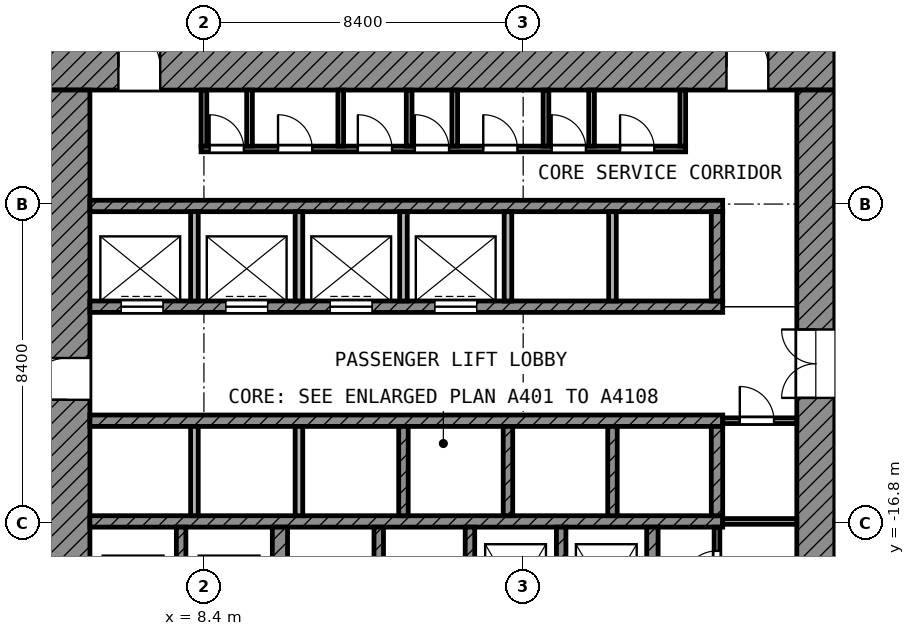
"""IFC4 building model, lengths in metres.
Left out: names, types, materials, properties, quantities, classifications, styles, units other than length and angle.
Written with IfcOpenShell. Run it as: python <this file> out.ifc"""

import sys

from ifc_helpers import new_model, si_unit, direction, frame, frame_2d, origin, place, context, subcontext, project, spatial, rectangle, extrude, element, fill, save


model = new_model("IFC4")
c1 = context("Model", 3, precision=1e-05, world=origin(), true_north=direction((0.0, 1.0)))
c2 = subcontext(c1, "Body", "Model", "MODEL_VIEW")
j1 = project(units=[si_unit("LENGTHUNIT", "METRE"), si_unit("PLANEANGLEUNIT", "RADIAN")], contexts=[c1])
p1 = place(None, origin())
s1 = spatial("IfcSite", under=j1, at=p1, CompositionType="ELEMENT")
p2 = place(p1, origin())
s2 = spatial("IfcBuilding", under=s1, at=p2, CompositionType="ELEMENT")
p3 = place(p2, frame((0.0, 0.0, 132.4)))
s3 = spatial("IfcBuildingStorey", under=s2, at=p3, CompositionType="ELEMENT", Elevation=132.4)
p4 = place(p3, frame((4.2, -4.8, 0.0), z_axis=(0.0, 0.0, 1.0), x_axis=(1.0, 0.0, 0.0)))
e1 = element("IfcWall", 1, at=p4, inside=s3, PredefinedType="SHEAR", context=c2, shape_type="SweptSolid", body=[
    extrude(rectangle(XDim=20.8, YDim=1.2, at=frame_2d((10.4, 0.0))), origin(), (0.0, 0.0, 1.0), 3.6),
])
p5 = place(p4, frame((1.95, 0.0, 0.0)))
e2 = element("IfcOpeningElement", 2, at=p5, cuts=e1, PredefinedType="OPENING", context=c2, shape_type="SweptSolid", body=[
    extrude(rectangle(XDim=1.1, YDim=2.1, at=frame_2d((0.55, 1.05))), frame((0.0, 0.61, 0.0), z_axis=(0.0, -1.0, 0.0), x_axis=(1.0, 0.0, 0.0)), (0.0, 0.0, 1.0), 1.22),
])
p6 = place(p4, frame((17.95, 0.0, 0.0)))
e3 = element("IfcOpeningElement", 3, at=p6, cuts=e1, PredefinedType="OPENING", context=c2, shape_type="SweptSolid", body=[
    extrude(rectangle(XDim=1.1, YDim=2.1, at=frame_2d((0.55, 1.05))), frame((0.0, 0.61, 0.0), z_axis=(0.0, -1.0, 0.0), x_axis=(1.0, 0.0, 0.0)), (0.0, 0.0, 1.0), 1.22),
])
p7 = place(p3, frame((4.8, -25.0, 0.0), z_axis=(0.0, 0.0, 1.0), x_axis=(0.0, 1.0, 0.0)))
e4 = element("IfcWall", 4, at=p7, inside=s3, PredefinedType="SHEAR", context=c2, shape_type="SweptSolid", body=[
    extrude(rectangle(XDim=19.6, YDim=1.2, at=frame_2d((9.8, 0.0))), origin(), (0.0, 0.0, 1.0), 3.6),
])
p8 = place(p7, frame((11.45, 0.0, 0.0)))
e5 = element("IfcOpeningElement", 5, at=p8, cuts=e4, PredefinedType="OPENING", context=c2, shape_type="SweptSolid", body=[
    extrude(rectangle(XDim=1.1, YDim=2.1, at=frame_2d((0.55, 1.05))), frame((0.0, 0.61, 0.0), z_axis=(0.0, -1.0, 0.0), x_axis=(1.0, 0.0, 0.0)), (0.0, 0.0, 1.0), 1.22),
])
p9 = place(p7, frame((2.15, 0.0, 0.0)))
e6 = element("IfcOpeningElement", 6, at=p9, cuts=e4, PredefinedType="OPENING", context=c2, shape_type="SweptSolid", body=[
    extrude(rectangle(XDim=1.1, YDim=2.1, at=frame_2d((0.55, 1.05))), frame((0.0, 0.61, 0.0), z_axis=(0.0, -1.0, 0.0), x_axis=(1.0, 0.0, 0.0)), (0.0, 0.0, 1.0), 1.22),
])
p10 = place(p3, frame((24.5, -24.0, 0.0), z_axis=(0.0, 0.0, 1.0), x_axis=(0.0, 1.0, 0.0)))
e7 = element("IfcWall", 7, at=p10, inside=s3, PredefinedType="SHEAR", context=c2, shape_type="SweptSolid", body=[
    extrude(rectangle(XDim=18.6, YDim=1.0, at=frame_2d((9.3, 0.0))), origin(), (0.0, 0.0, 1.0), 3.6),
])
p11 = place(p10, frame((10.5, 0.0, 0.0)))
e8 = element("IfcOpeningElement", 8, at=p11, cuts=e7, PredefinedType="OPENING", context=c2, shape_type="SweptSolid", body=[
    extrude(rectangle(XDim=1.8, YDim=2.1, at=frame_2d((0.9, 1.05))), frame((0.0, 0.51, 0.0), z_axis=(0.0, -1.0, 0.0), x_axis=(1.0, 0.0, 0.0)), (0.0, 0.0, 1.0), 1.02),
])
p12 = place(p3, frame((5.4, -8.45, 0.0), z_axis=(0.0, 0.0, 1.0), x_axis=(1.0, 0.0, 0.0)))
e9 = element("IfcWall", 9, at=p12, inside=s3, PredefinedType="SHEAR", context=c2, shape_type="SweptSolid", body=[
    extrude(rectangle(XDim=16.65, YDim=0.3, at=frame_2d((8.325, 0.0))), origin(), (0.0, 0.0, 1.0), 3.6),
])
p13 = place(p3, frame((5.4, -11.1, 0.0), z_axis=(0.0, 0.0, 1.0), x_axis=(1.0, 0.0, 0.0)))
e10 = element("IfcWall", 10, at=p13, inside=s3, PredefinedType="SHEAR", context=c2, shape_type="SweptSolid", body=[
    extrude(rectangle(XDim=16.65, YDim=0.3, at=frame_2d((8.325, 0.0))), origin(), (0.0, 0.0, 1.0), 3.6),
])
p14 = place(p13, frame((0.825, 0.0, 0.0)))
e11 = element("IfcOpeningElement", 11, at=p14, cuts=e10, PredefinedType="OPENING", context=c2, shape_type="SweptSolid", body=[
    extrude(rectangle(XDim=1.1, YDim=2.1, at=frame_2d((0.55, 1.05))), frame((0.0, 0.16, 0.0), z_axis=(0.0, -1.0, 0.0), x_axis=(1.0, 0.0, 0.0)), (0.0, 0.0, 1.0), 0.32),
])
p15 = place(p13, frame((3.575, 0.0, 0.0)))
e12 = element("IfcOpeningElement", 12, at=p15, cuts=e10, PredefinedType="OPENING", context=c2, shape_type="SweptSolid", body=[
    extrude(rectangle(XDim=1.1, YDim=2.1, at=frame_2d((0.55, 1.05))), frame((0.0, 0.16, 0.0), z_axis=(0.0, -1.0, 0.0), x_axis=(1.0, 0.0, 0.0)), (0.0, 0.0, 1.0), 0.32),
])
p16 = place(p13, frame((6.325, 0.0, 0.0)))
e13 = element("IfcOpeningElement", 13, at=p16, cuts=e10, PredefinedType="OPENING", context=c2, shape_type="SweptSolid", body=[
    extrude(rectangle(XDim=1.1, YDim=2.1, at=frame_2d((0.55, 1.05))), frame((0.0, 0.16, 0.0), z_axis=(0.0, -1.0, 0.0), x_axis=(1.0, 0.0, 0.0)), (0.0, 0.0, 1.0), 0.32),
])
p17 = place(p13, frame((9.075, 0.0, 0.0)))
e14 = element("IfcOpeningElement", 14, at=p17, cuts=e10, PredefinedType="OPENING", context=c2, shape_type="SweptSolid", body=[
    extrude(rectangle(XDim=1.1, YDim=2.1, at=frame_2d((0.55, 1.05))), frame((0.0, 0.16, 0.0), z_axis=(0.0, -1.0, 0.0), x_axis=(1.0, 0.0, 0.0)), (0.0, 0.0, 1.0), 0.32),
])
for number, where, z_axis, x_axis in (
    (15, (5.4, -14.1, 0.0), (0.0, 0.0, 1.0), (1.0, 0.0, 0.0)),
    (16, (5.4, -16.75, 0.0), (0.0, 0.0, 1.0), (1.0, 0.0, 0.0)),
):
    element("IfcWall", number, at=place(p3, frame(where, z_axis=z_axis, x_axis=x_axis)), inside=s3, PredefinedType="SHEAR", context=c2, shape_type="SweptSolid", body=[
        extrude(rectangle(XDim=16.65, YDim=0.3, at=frame_2d((8.325, 0.0))), origin(), (0.0, 0.0, 1.0), 3.6),
    ])
p18 = place(p3, frame((10.4, -20.05, 0.0), z_axis=(0.0, 0.0, 1.0), x_axis=(0.0, 1.0, 0.0)))
e17 = element("IfcWall", 17, at=p18, inside=s3, PredefinedType="SHEAR", context=c2, shape_type="SweptSolid", body=[
    extrude(rectangle(XDim=3.15, YDim=0.4, at=frame_2d((1.575, 0.0))), origin(), (0.0, 0.0, 1.0), 3.6),
])
p19 = place(p3, frame((20.2, -20.35, 0.0), z_axis=(0.0, 0.0, 1.0), x_axis=(0.0, 1.0, 0.0)))
e18 = element("IfcWall", 18, at=p19, inside=s3, PredefinedType="SHEAR", context=c2, shape_type="SweptSolid", body=[
    extrude(rectangle(XDim=3.45, YDim=0.3, at=frame_2d((1.725, 0.0))), origin(), (0.0, 0.0, 1.0), 3.6),
])
p20 = place(p3, frame((21.9, -10.95, 0.0), z_axis=(0.0, 0.0, 1.0), x_axis=(0.0, 1.0, 0.0)))
e19 = element("IfcWall", 19, at=p20, inside=s3, PredefinedType="SHEAR", context=c2, shape_type="SweptSolid", body=[
    extrude(rectangle(XDim=2.35, YDim=0.3, at=frame_2d((1.175, 0.0))), origin(), (0.0, 0.0, 1.0), 3.6),
])
p21 = place(p3, frame((21.9, -16.6, 0.0), z_axis=(0.0, 0.0, 1.0), x_axis=(0.0, 1.0, 0.0)))
e20 = element("IfcWall", 20, at=p21, inside=s3, PredefinedType="SHEAR", context=c2, shape_type="SweptSolid", body=[
    extrude(rectangle(XDim=2.35, YDim=0.3, at=frame_2d((1.175, 0.0))), origin(), (0.0, 0.0, 1.0), 3.6),
])
for number, where, z_axis, x_axis in (
    (21, (7.8, -20.05, 0.0), (0.0, 0.0, 1.0), (0.0, 1.0, 0.0)),
    (22, (13.0, -20.05, 0.0), (0.0, 0.0, 1.0), (0.0, 1.0, 0.0)),
    (23, (15.4, -20.05, 0.0), (0.0, 0.0, 1.0), (0.0, 1.0, 0.0)),
    (24, (17.8, -20.05, 0.0), (0.0, 0.0, 1.0), (0.0, 1.0, 0.0)),
):
    element("IfcWall", number, at=place(p3, frame(where, z_axis=z_axis, x_axis=x_axis)), inside=s3, PredefinedType="SHEAR", context=c2, shape_type="SweptSolid", body=[
        extrude(rectangle(XDim=3.15, YDim=0.25, at=frame_2d((1.575, 0.0))), origin(), (0.0, 0.0, 1.0), 3.6),
    ])
for number, where, z_axis, x_axis in (
    (25, (8.15, -10.95, 0.0), (0.0, 0.0, 1.0), (0.0, 1.0, 0.0)),
    (26, (10.9, -10.95, 0.0), (0.0, 0.0, 1.0), (0.0, 1.0, 0.0)),
    (27, (13.65, -10.95, 0.0), (0.0, 0.0, 1.0), (0.0, 1.0, 0.0)),
    (28, (16.4, -10.95, 0.0), (0.0, 0.0, 1.0), (0.0, 1.0, 0.0)),
    (29, (19.15, -10.95, 0.0), (0.0, 0.0, 1.0), (0.0, 1.0, 0.0)),
):
    element("IfcWall", number, at=place(p3, frame(where, z_axis=z_axis, x_axis=x_axis)), inside=s3, PredefinedType="PARTITIONING", context=c2, shape_type="SweptSolid", body=[
        extrude(rectangle(XDim=2.35, YDim=0.2, at=frame_2d((1.175, 0.0))), origin(), (0.0, 0.0, 1.0), 3.6),
    ])
for number, where, z_axis, x_axis in (
    (30, (8.15, -16.6, 0.0), (0.0, 0.0, 1.0), (0.0, 1.0, 0.0)),
    (31, (10.9, -16.6, 0.0), (0.0, 0.0, 1.0), (0.0, 1.0, 0.0)),
):
    element("IfcWall", number, at=place(p3, frame(where, z_axis=z_axis, x_axis=x_axis)), inside=s3, PredefinedType="PARTITIONING", context=c2, shape_type="SweptSolid", body=[
        extrude(rectangle(XDim=2.35, YDim=0.2, at=frame_2d((1.175, 0.0))), origin(), (0.0, 0.0, 1.0), 3.6),
    ])
for number, where, z_axis, x_axis in (
    (32, (13.65, -16.6, 0.0), (0.0, 0.0, 1.0), (0.0, 1.0, 0.0)),
    (33, (16.4, -16.6, 0.0), (0.0, 0.0, 1.0), (0.0, 1.0, 0.0)),
    (34, (19.15, -16.6, 0.0), (0.0, 0.0, 1.0), (0.0, 1.0, 0.0)),
):
    element("IfcWall", number, at=place(p3, frame(where, z_axis=z_axis, x_axis=x_axis)), inside=s3, PredefinedType="SHEAR", context=c2, shape_type="SweptSolid", body=[
        extrude(rectangle(XDim=2.35, YDim=0.25, at=frame_2d((1.175, 0.0))), origin(), (0.0, 0.0, 1.0), 3.6),
    ])
p22 = place(p3, frame((21.9, -19.05, 0.0), z_axis=(0.0, 0.0, 1.0), x_axis=(0.0, 1.0, 0.0)))
e35 = element("IfcWall", 35, at=p22, inside=s3, PredefinedType="PARTITIONING", context=c2, shape_type="SweptSolid", body=[
    extrude(rectangle(XDim=2.15, YDim=0.15, at=frame_2d((1.075, 0.0))), origin(), (0.0, 0.0, 1.0), 3.6),
])
p23 = place(p22, frame((0.625, 0.0, 0.0)))
e36 = element("IfcOpeningElement", 36, at=p23, cuts=e35, PredefinedType="OPENING", context=c2, shape_type="SweptSolid", body=[
    extrude(rectangle(XDim=0.9, YDim=2.1, at=frame_2d((0.45, 1.05))), frame((0.0, 0.085, 0.0), z_axis=(0.0, -1.0, 0.0), x_axis=(1.0, 0.0, 0.0)), (0.0, 0.0, 1.0), 0.17),
])
p24 = place(p3, frame((22.05, -16.75, 0.0), z_axis=(0.0, 0.0, 1.0), x_axis=(1.0, 0.0, 0.0)))
e37 = element("IfcWall", 37, at=p24, inside=s3, PredefinedType="PARTITIONING", context=c2, shape_type="SweptSolid", body=[
    extrude(rectangle(XDim=1.95, YDim=0.15, at=frame_2d((0.975, 0.0))), origin(), (0.0, 0.0, 1.0), 3.6),
])
p25 = place(p3, frame((22.05, -14.1, 0.0), z_axis=(0.0, 0.0, 1.0), x_axis=(1.0, 0.0, 0.0)))
e38 = element("IfcWall", 38, at=p25, inside=s3, PredefinedType="PARTITIONING", context=c2, shape_type="SweptSolid", body=[
    extrude(rectangle(XDim=1.95, YDim=0.15, at=frame_2d((0.975, 0.0))), origin(), (0.0, 0.0, 1.0), 3.6),
])
p26 = place(p25, frame((0.45, 0.0, 0.0)))
e39 = element("IfcOpeningElement", 39, at=p26, cuts=e38, PredefinedType="OPENING", context=c2, shape_type="SweptSolid", body=[
    extrude(rectangle(XDim=0.9, YDim=2.1, at=frame_2d((0.45, 1.05))), frame((0.0, 0.085, 0.0), z_axis=(0.0, -1.0, 0.0), x_axis=(1.0, 0.0, 0.0)), (0.0, 0.0, 1.0), 0.17),
])
p27 = place(p3, frame((8.325, -6.95, 0.0), z_axis=(0.0, 0.0, 1.0), x_axis=(1.0, 0.0, 0.0)))
e40 = element("IfcWall", 40, at=p27, inside=s3, PredefinedType="PARTITIONING", context=c2, shape_type="SweptSolid", body=[
    extrude(rectangle(XDim=12.75, YDim=0.15, at=frame_2d((6.375, 0.0))), origin(), (0.0, 0.0, 1.0), 3.6),
])
p28 = place(p27, frame((0.225, 0.0, 0.0)))
e41 = element("IfcOpeningElement", 41, at=p28, cuts=e40, PredefinedType="OPENING", context=c2, shape_type="SweptSolid", body=[
    extrude(rectangle(XDim=0.9, YDim=2.1, at=frame_2d((0.45, 1.05))), frame((0.0, 0.085, 0.0), z_axis=(0.0, -1.0, 0.0), x_axis=(1.0, 0.0, 0.0)), (0.0, 0.0, 1.0), 0.17),
])
p29 = place(p27, frame((2.025, 0.0, 0.0)))
e42 = element("IfcOpeningElement", 42, at=p29, cuts=e40, PredefinedType="OPENING", context=c2, shape_type="SweptSolid", body=[
    extrude(rectangle(XDim=0.9, YDim=2.1, at=frame_2d((0.45, 1.05))), frame((0.0, 0.085, 0.0), z_axis=(0.0, -1.0, 0.0), x_axis=(1.0, 0.0, 0.0)), (0.0, 0.0, 1.0), 0.17),
])
p30 = place(p27, frame((4.125, 0.0, 0.0)))
e43 = element("IfcOpeningElement", 43, at=p30, cuts=e40, PredefinedType="OPENING", context=c2, shape_type="SweptSolid", body=[
    extrude(rectangle(XDim=0.9, YDim=2.1, at=frame_2d((0.45, 1.05))), frame((0.0, 0.085, 0.0), z_axis=(0.0, -1.0, 0.0), x_axis=(1.0, 0.0, 0.0)), (0.0, 0.0, 1.0), 0.17),
])
p31 = place(p27, frame((5.625, 0.0, 0.0)))
e44 = element("IfcOpeningElement", 44, at=p31, cuts=e40, PredefinedType="OPENING", context=c2, shape_type="SweptSolid", body=[
    extrude(rectangle(XDim=0.9, YDim=2.1, at=frame_2d((0.45, 1.05))), frame((0.0, 0.085, 0.0), z_axis=(0.0, -1.0, 0.0), x_axis=(1.0, 0.0, 0.0)), (0.0, 0.0, 1.0), 0.17),
])
p32 = place(p27, frame((7.425, 0.0, 0.0)))
e45 = element("IfcOpeningElement", 45, at=p32, cuts=e40, PredefinedType="OPENING", context=c2, shape_type="SweptSolid", body=[
    extrude(rectangle(XDim=0.9, YDim=2.1, at=frame_2d((0.45, 1.05))), frame((0.0, 0.085, 0.0), z_axis=(0.0, -1.0, 0.0), x_axis=(1.0, 0.0, 0.0)), (0.0, 0.0, 1.0), 0.17),
])
p33 = place(p27, frame((9.225, 0.0, 0.0)))
e46 = element("IfcOpeningElement", 46, at=p33, cuts=e40, PredefinedType="OPENING", context=c2, shape_type="SweptSolid", body=[
    extrude(rectangle(XDim=0.9, YDim=2.1, at=frame_2d((0.45, 1.05))), frame((0.0, 0.085, 0.0), z_axis=(0.0, -1.0, 0.0), x_axis=(1.0, 0.0, 0.0)), (0.0, 0.0, 1.0), 0.17),
])
p34 = place(p27, frame((11.025, 0.0, 0.0)))
e47 = element("IfcOpeningElement", 47, at=p34, cuts=e40, PredefinedType="OPENING", context=c2, shape_type="SweptSolid", body=[
    extrude(rectangle(XDim=0.9, YDim=2.1, at=frame_2d((0.45, 1.05))), frame((0.0, 0.085, 0.0), z_axis=(0.0, -1.0, 0.0), x_axis=(1.0, 0.0, 0.0)), (0.0, 0.0, 1.0), 0.17),
])
for number, where, z_axis, x_axis in (
    (48, (8.4, -6.875, 0.0), (0.0, 0.0, 1.0), (0.0, 1.0, 0.0)),
    (49, (9.6, -6.875, 0.0), (0.0, 0.0, 1.0), (0.0, 1.0, 0.0)),
    (50, (12.0, -6.875, 0.0), (0.0, 0.0, 1.0), (0.0, 1.0, 0.0)),
    (51, (13.8, -6.875, 0.0), (0.0, 0.0, 1.0), (0.0, 1.0, 0.0)),
    (52, (15.0, -6.875, 0.0), (0.0, 0.0, 1.0), (0.0, 1.0, 0.0)),
    (53, (17.4, -6.875, 0.0), (0.0, 0.0, 1.0), (0.0, 1.0, 0.0)),
    (54, (18.6, -6.875, 0.0), (0.0, 0.0, 1.0), (0.0, 1.0, 0.0)),
    (55, (21.0, -6.875, 0.0), (0.0, 0.0, 1.0), (0.0, 1.0, 0.0)),
):
    element("IfcWall", number, at=place(p3, frame(where, z_axis=z_axis, x_axis=x_axis)), inside=s3, PredefinedType="PARTITIONING", context=c2, shape_type="SweptSolid", body=[
        extrude(rectangle(XDim=1.475, YDim=0.15, at=frame_2d((0.738, 0.0))), origin(), (0.0, 0.0, 1.0), 3.6),
    ])
p35 = place(p14, origin())
e56 = element("IfcDoor", 56, at=p35, inside=s3, OperationType="DOUBLE_DOOR_SLIDING", PredefinedType="DOOR", context=c2, shape_type="SweptSolid", body=[
    extrude(rectangle(XDim=1.1, YDim=2.1, at=frame_2d((0.55, 1.05))), frame((0.0, 0.025, 0.0), z_axis=(0.0, -1.0, 0.0), x_axis=(1.0, 0.0, 0.0)), (0.0, 0.0, 1.0), 0.05),
])
fill(e11, e56)
p36 = place(p15, origin())
e57 = element("IfcDoor", 57, at=p36, inside=s3, OperationType="DOUBLE_DOOR_SLIDING", PredefinedType="DOOR", context=c2, shape_type="SweptSolid", body=[
    extrude(rectangle(XDim=1.1, YDim=2.1, at=frame_2d((0.55, 1.05))), frame((0.0, 0.025, 0.0), z_axis=(0.0, -1.0, 0.0), x_axis=(1.0, 0.0, 0.0)), (0.0, 0.0, 1.0), 0.05),
])
fill(e12, e57)
p37 = place(p16, origin())
e58 = element("IfcDoor", 58, at=p37, inside=s3, OperationType="DOUBLE_DOOR_SLIDING", PredefinedType="DOOR", context=c2, shape_type="SweptSolid", body=[
    extrude(rectangle(XDim=1.1, YDim=2.1, at=frame_2d((0.55, 1.05))), frame((0.0, 0.025, 0.0), z_axis=(0.0, -1.0, 0.0), x_axis=(1.0, 0.0, 0.0)), (0.0, 0.0, 1.0), 0.05),
])
fill(e13, e58)
p38 = place(p17, origin())
e59 = element("IfcDoor", 59, at=p38, inside=s3, OperationType="DOUBLE_DOOR_SLIDING", PredefinedType="DOOR", context=c2, shape_type="SweptSolid", body=[
    extrude(rectangle(XDim=1.1, YDim=2.1, at=frame_2d((0.55, 1.05))), frame((0.0, 0.025, 0.0), z_axis=(0.0, -1.0, 0.0), x_axis=(1.0, 0.0, 0.0)), (0.0, 0.0, 1.0), 0.05),
])
fill(e14, e59)
p39 = place(p8, origin())
e60 = element("IfcDoor", 60, at=p39, inside=s3, OperationType="SINGLE_SWING_LEFT", PredefinedType="DOOR", context=c2, shape_type="SweptSolid", body=[
    extrude(rectangle(XDim=1.1, YDim=2.1, at=frame_2d((0.55, 1.05))), frame((0.0, 0.025, 0.0), z_axis=(0.0, -1.0, 0.0), x_axis=(1.0, 0.0, 0.0)), (0.0, 0.0, 1.0), 0.05),
])
fill(e5, e60)
p40 = place(p5, origin())
e61 = element("IfcDoor", 61, at=p40, inside=s3, OperationType="SINGLE_SWING_LEFT", PredefinedType="DOOR", context=c2, shape_type="SweptSolid", body=[
    extrude(rectangle(XDim=1.1, YDim=2.1, at=frame_2d((0.55, 1.05))), frame((0.0, 0.025, 0.0), z_axis=(0.0, -1.0, 0.0), x_axis=(1.0, 0.0, 0.0)), (0.0, 0.0, 1.0), 0.05),
])
fill(e2, e61)
p41 = place(p6, origin())
e62 = element("IfcDoor", 62, at=p41, inside=s3, OperationType="SINGLE_SWING_LEFT", PredefinedType="DOOR", context=c2, shape_type="SweptSolid", body=[
    extrude(rectangle(XDim=1.1, YDim=2.1, at=frame_2d((0.55, 1.05))), frame((0.0, 0.025, 0.0), z_axis=(0.0, -1.0, 0.0), x_axis=(1.0, 0.0, 0.0)), (0.0, 0.0, 1.0), 0.05),
])
fill(e3, e62)
p42 = place(p11, origin())
e63 = element("IfcDoor", 63, at=p42, inside=s3, OperationType="DOUBLE_DOOR_SINGLE_SWING", PredefinedType="DOOR", context=c2, shape_type="SweptSolid", body=[
    extrude(rectangle(XDim=1.8, YDim=2.1, at=frame_2d((0.9, 1.05))), frame((0.0, 0.025, 0.0), z_axis=(0.0, -1.0, 0.0), x_axis=(1.0, 0.0, 0.0)), (0.0, 0.0, 1.0), 0.05),
])
fill(e8, e63)
p43 = place(p28, origin())
e64 = element("IfcDoor", 64, at=p43, inside=s3, OperationType="SINGLE_SWING_LEFT", PredefinedType="DOOR", context=c2, shape_type="SweptSolid", body=[
    extrude(rectangle(XDim=0.9, YDim=2.1, at=frame_2d((0.45, 1.05))), frame((0.0, 0.025, 0.0), z_axis=(0.0, -1.0, 0.0), x_axis=(1.0, 0.0, 0.0)), (0.0, 0.0, 1.0), 0.05),
])
fill(e41, e64)
p44 = place(p29, origin())
e65 = element("IfcDoor", 65, at=p44, inside=s3, OperationType="SINGLE_SWING_LEFT", PredefinedType="DOOR", context=c2, shape_type="SweptSolid", body=[
    extrude(rectangle(XDim=0.9, YDim=2.1, at=frame_2d((0.45, 1.05))), frame((0.0, 0.025, 0.0), z_axis=(0.0, -1.0, 0.0), x_axis=(1.0, 0.0, 0.0)), (0.0, 0.0, 1.0), 0.05),
])
fill(e42, e65)
p45 = place(p30, origin())
e66 = element("IfcDoor", 66, at=p45, inside=s3, OperationType="SINGLE_SWING_LEFT", PredefinedType="DOOR", context=c2, shape_type="SweptSolid", body=[
    extrude(rectangle(XDim=0.9, YDim=2.1, at=frame_2d((0.45, 1.05))), frame((0.0, 0.025, 0.0), z_axis=(0.0, -1.0, 0.0), x_axis=(1.0, 0.0, 0.0)), (0.0, 0.0, 1.0), 0.05),
])
fill(e43, e66)
p46 = place(p31, origin())
e67 = element("IfcDoor", 67, at=p46, inside=s3, OperationType="SINGLE_SWING_LEFT", PredefinedType="DOOR", context=c2, shape_type="SweptSolid", body=[
    extrude(rectangle(XDim=0.9, YDim=2.1, at=frame_2d((0.45, 1.05))), frame((0.0, 0.025, 0.0), z_axis=(0.0, -1.0, 0.0), x_axis=(1.0, 0.0, 0.0)), (0.0, 0.0, 1.0), 0.05),
])
fill(e44, e67)
p47 = place(p32, origin())
e68 = element("IfcDoor", 68, at=p47, inside=s3, OperationType="SINGLE_SWING_LEFT", PredefinedType="DOOR", context=c2, shape_type="SweptSolid", body=[
    extrude(rectangle(XDim=0.9, YDim=2.1, at=frame_2d((0.45, 1.05))), frame((0.0, 0.025, 0.0), z_axis=(0.0, -1.0, 0.0), x_axis=(1.0, 0.0, 0.0)), (0.0, 0.0, 1.0), 0.05),
])
fill(e45, e68)
p48 = place(p33, origin())
e69 = element("IfcDoor", 69, at=p48, inside=s3, OperationType="SINGLE_SWING_LEFT", PredefinedType="DOOR", context=c2, shape_type="SweptSolid", body=[
    extrude(rectangle(XDim=0.9, YDim=2.1, at=frame_2d((0.45, 1.05))), frame((0.0, 0.025, 0.0), z_axis=(0.0, -1.0, 0.0), x_axis=(1.0, 0.0, 0.0)), (0.0, 0.0, 1.0), 0.05),
])
fill(e46, e69)
p49 = place(p34, origin())
e70 = element("IfcDoor", 70, at=p49, inside=s3, OperationType="SINGLE_SWING_LEFT", PredefinedType="DOOR", context=c2, shape_type="SweptSolid", body=[
    extrude(rectangle(XDim=0.9, YDim=2.1, at=frame_2d((0.45, 1.05))), frame((0.0, 0.025, 0.0), z_axis=(0.0, -1.0, 0.0), x_axis=(1.0, 0.0, 0.0)), (0.0, 0.0, 1.0), 0.05),
])
fill(e47, e70)
p50 = place(p26, origin())
e71 = element("IfcDoor", 71, at=p50, inside=s3, OperationType="SINGLE_SWING_LEFT", PredefinedType="DOOR", context=c2, shape_type="SweptSolid", body=[
    extrude(rectangle(XDim=0.9, YDim=2.1, at=frame_2d((0.45, 1.05))), frame((0.0, 0.025, 0.0), z_axis=(0.0, -1.0, 0.0), x_axis=(1.0, 0.0, 0.0)), (0.0, 0.0, 1.0), 0.05),
])
fill(e39, e71)
p51 = place(p23, origin())
e72 = element("IfcDoor", 72, at=p51, inside=s3, OperationType="SINGLE_SWING_LEFT", PredefinedType="DOOR", context=c2, shape_type="SweptSolid", body=[
    extrude(rectangle(XDim=0.9, YDim=2.1, at=frame_2d((0.45, 1.05))), frame((0.0, 0.025, 0.0), z_axis=(0.0, -1.0, 0.0), x_axis=(1.0, 0.0, 0.0)), (0.0, 0.0, 1.0), 0.05),
])
fill(e36, e72)
save(model, sys.argv[1])
